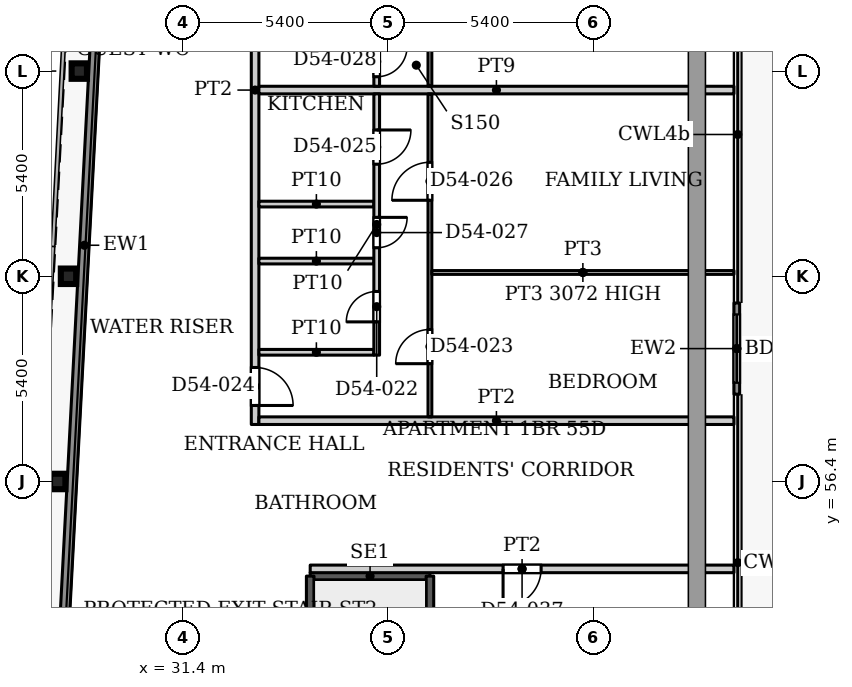
"""IFC4 building model, lengths in metres.
Left out: names, types, materials, properties, quantities, classifications, styles, units other than length and angle.
Written with IfcOpenShell. Run it as: python <this file> out.ifc"""

import sys

from ifc_helpers import new_model, si_unit, direction, frame, frame_2d, origin, origin_2d, place, context, subcontext, project, spatial, rectangle, i_section, extrude, source, transform, mapped, element, fill, save


model = new_model("IFC4")
c1 = context("Model", 3, precision=1e-05, world=origin(), true_north=direction((0.0, 1.0)))
c2 = subcontext(c1, "Body", "Model", "MODEL_VIEW")
j1 = project(units=[si_unit("LENGTHUNIT", "METRE"), si_unit("PLANEANGLEUNIT", "RADIAN")], contexts=[c1])
p1 = place(None, origin())
s1 = spatial("IfcSite", under=j1, at=p1, CompositionType="ELEMENT")
p2 = place(p1, origin())
s2 = spatial("IfcBuilding", under=s1, at=p2, CompositionType="ELEMENT")
p3 = place(p2, frame((0.0, 0.0, 235.7)))
s3 = spatial("IfcBuildingStorey", under=s2, at=p3, CompositionType="ELEMENT", Elevation=235.7)
for number, where, z_axis, x_axis in (
    (1, (28.106, 56.4, 0.0), (0.0, 0.0, 1.0), (1.0, 0.0, 0.0)),
    (2, (28.39, 61.8, 0.0), (0.0, 0.0, 1.0), (1.0, 0.0, 0.0)),
    (3, (28.674, 67.2, 0.0), (0.0, 0.0, 1.0), (1.0, 0.0, 0.0)),
):
    element("IfcColumn", number, at=place(p3, frame(where, z_axis=z_axis, x_axis=x_axis)), inside=s3, PredefinedType="COLUMN", context=c2, shape_type="SweptSolid", body=[
        extrude(i_section(OverallWidth=0.404, OverallDepth=0.407, WebThickness=0.027, FlangeThickness=0.044, FilletRadius=0.012, at=origin_2d()), origin(), (0.0, 0.0, 1.0), 3.9),
    ])
p4 = place(p3, frame((45.975, 61.097, 0.0), z_axis=(0.0, 0.0, 1.0), x_axis=(0.0, -1.0, 0.0)))
e4 = element("IfcWall", 4, at=p4, inside=s3, PredefinedType="SOLIDWALL", context=c2, shape_type="SweptSolid", body=[
    extrude(rectangle(XDim=2.4, YDim=0.15, at=frame_2d((1.2, 0.0))), origin(), (0.0, 0.0, 1.0), 3.75),
])
p5 = place(p4, frame((0.3, 0.0, 0.0)))
e5 = element("IfcOpeningElement", 5, at=p5, cuts=e4, PredefinedType="OPENING", context=c2, shape_type="SweptSolid", body=[
    extrude(rectangle(XDim=1.8, YDim=2.4, at=frame_2d((0.9, 1.2))), frame((0.0, 0.085, 0.0), z_axis=(0.0, -1.0, 0.0), x_axis=(1.0, 0.0, 0.0)), (0.0, 0.0, 1.0), 0.17),
])
p6 = place(p3, frame((27.195, 31.969, 0.0), z_axis=(0.0, 0.0, 1.0), x_axis=(0.052555284099, 0.998618016117, 0.0)))
e6 = element("IfcWall", 6, at=p6, inside=s3, PredefinedType="SOLIDWALL", context=c2, shape_type="SweptSolid", body=[
    extrude(rectangle(XDim=61.38, YDim=0.25, at=frame_2d((30.69, 0.0))), origin(), (0.0, 0.0, 1.0), 3.75),
])
p7 = place(p3, frame((34.75, 53.91, 0.0), z_axis=(0.0, 0.0, 1.0), x_axis=(1.0, 0.0, 0.0)))
e7 = element("IfcWall", 7, at=p7, inside=s3, PredefinedType="SHEAR", context=c2, shape_type="SweptSolid", body=[
    extrude(rectangle(XDim=3.15, YDim=0.2, at=frame_2d((1.575, 0.0))), origin(), (0.0, 0.0, 1.0), 3.9),
])
p8 = place(p3, frame((34.75, 47.5, 0.0), z_axis=(0.0, 0.0, 1.0), x_axis=(0.0, 1.0, 0.0)))
e8 = element("IfcWall", 8, at=p8, inside=s3, PredefinedType="SHEAR", context=c2, shape_type="SweptSolid", body=[
    extrude(rectangle(XDim=6.41, YDim=0.2, at=frame_2d((3.205, 0.0))), origin(), (0.0, 0.0, 1.0), 3.9),
])
p9 = place(p3, frame((37.9, 44.75, 0.0), z_axis=(0.0, 0.0, 1.0), x_axis=(0.0, 1.0, 0.0)))
e9 = element("IfcWall", 9, at=p9, inside=s3, PredefinedType="SHEAR", context=c2, shape_type="SweptSolid", body=[
    extrude(rectangle(XDim=9.16, YDim=0.2, at=frame_2d((4.58, 0.0))), origin(), (0.0, 0.0, 1.0), 3.9),
])
p10 = place(p3, frame((33.3, 57.9, 0.0), z_axis=(0.0, 0.0, 1.0), x_axis=(0.0, 1.0, 0.0)))
e10 = element("IfcWall", 10, at=p10, inside=s3, PredefinedType="PARTITIONING", context=c2, shape_type="SweptSolid", body=[
    extrude(rectangle(XDim=17.6, YDim=0.2, at=frame_2d((8.8, 0.0))), origin(), (0.0, 0.0, 1.0), 3.6),
])
p11 = place(p10, frame((0.5, 0.0, 0.0)))
e11 = element("IfcOpeningElement", 11, at=p11, cuts=e10, PredefinedType="OPENING", context=c2, shape_type="SweptSolid", body=[
    extrude(rectangle(XDim=1.0, YDim=2.1, at=frame_2d((0.5, 1.05))), frame((0.0, 0.11, 0.0), z_axis=(0.0, -1.0, 0.0), x_axis=(1.0, 0.0, 0.0)), (0.0, 0.0, 1.0), 0.22),
])
p12 = place(p10, frame((16.1, 0.0, 0.0)))
e12 = element("IfcOpeningElement", 12, at=p12, cuts=e10, PredefinedType="OPENING", context=c2, shape_type="SweptSolid", body=[
    extrude(rectangle(XDim=1.0, YDim=2.1, at=frame_2d((0.5, 1.05))), frame((0.0, 0.11, 0.0), z_axis=(0.0, -1.0, 0.0), x_axis=(1.0, 0.0, 0.0)), (0.0, 0.0, 1.0), 0.22),
])
p13 = place(p3, frame((33.4, 58.0, 0.0), z_axis=(0.0, 0.0, 1.0), x_axis=(1.0, 0.0, 0.0)))
e13 = element("IfcWall", 13, at=p13, inside=s3, PredefinedType="PARTITIONING", context=c2, shape_type="SweptSolid", body=[
    extrude(rectangle(XDim=12.5, YDim=0.2, at=frame_2d((6.25, 0.0))), origin(), (0.0, 0.0, 1.0), 3.6),
])
for number, where, z_axis, x_axis in (
    (14, (33.4, 59.8, 0.0), (0.0, 0.0, 1.0), (1.0, 0.0, 0.0)),
    (15, (33.4, 62.2, 0.0), (0.0, 0.0, 1.0), (1.0, 0.0, 0.0)),
    (16, (33.4, 63.7, 0.0), (0.0, 0.0, 1.0), (1.0, 0.0, 0.0)),
):
    element("IfcWall", number, at=place(p3, frame(where, z_axis=z_axis, x_axis=x_axis)), inside=s3, PredefinedType="PARTITIONING", context=c2, shape_type="SweptSolid", body=[
        extrude(rectangle(XDim=3.025, YDim=0.15, at=frame_2d((1.513, 0.0))), origin(), (0.0, 0.0, 1.0), 3.6),
    ])
p14 = place(p3, frame((33.4, 66.7, 0.0), z_axis=(0.0, 0.0, 1.0), x_axis=(1.0, 0.0, 0.0)))
e17 = element("IfcWall", 17, at=p14, inside=s3, PredefinedType="PARTITIONING", context=c2, shape_type="SweptSolid", body=[
    extrude(rectangle(XDim=12.5, YDim=0.2, at=frame_2d((6.25, 0.0))), origin(), (0.0, 0.0, 1.0), 3.6),
])
p15 = place(p3, frame((34.75, 54.1, 0.0), z_axis=(0.0, 0.0, 1.0), x_axis=(1.0, 0.0, 0.0)))
e18 = element("IfcWall", 18, at=p15, inside=s3, PredefinedType="PARTITIONING", context=c2, shape_type="SweptSolid", body=[
    extrude(rectangle(XDim=11.15, YDim=0.2, at=frame_2d((5.575, 0.0))), origin(), (0.0, 0.0, 1.0), 3.6),
])
p16 = place(p15, frame((5.075, 0.0, 0.0)))
e19 = element("IfcOpeningElement", 19, at=p16, cuts=e18, PredefinedType="OPENING", context=c2, shape_type="SweptSolid", body=[
    extrude(rectangle(XDim=1.0, YDim=2.1, at=frame_2d((0.5, 1.05))), frame((0.0, 0.11, 0.0), z_axis=(0.0, -1.0, 0.0), x_axis=(1.0, 0.0, 0.0)), (0.0, 0.0, 1.0), 0.22),
])
p17 = place(p3, frame((36.5, 59.725, 0.0), z_axis=(0.0, 0.0, 1.0), x_axis=(0.0, 1.0, 0.0)))
e20 = element("IfcWall", 20, at=p17, inside=s3, PredefinedType="PARTITIONING", context=c2, shape_type="SweptSolid", body=[
    extrude(rectangle(XDim=6.875, YDim=0.15, at=frame_2d((3.438, 0.0))), origin(), (0.0, 0.0, 1.0), 3.6),
])
p18 = place(p17, frame((0.875, 0.0, 0.0)))
e21 = element("IfcOpeningElement", 21, at=p18, cuts=e20, PredefinedType="OPENING", context=c2, shape_type="SweptSolid", body=[
    extrude(rectangle(XDim=0.8, YDim=2.1, at=frame_2d((0.4, 1.05))), frame((0.0, 0.085, 0.0), z_axis=(0.0, -1.0, 0.0), x_axis=(1.0, 0.0, 0.0)), (0.0, 0.0, 1.0), 0.17),
])
p19 = place(p17, frame((5.025, 0.0, 0.0)))
e22 = element("IfcOpeningElement", 22, at=p19, cuts=e20, PredefinedType="OPENING", context=c2, shape_type="SweptSolid", body=[
    extrude(rectangle(XDim=0.9, YDim=2.1, at=frame_2d((0.45, 1.05))), frame((0.0, 0.085, 0.0), z_axis=(0.0, -1.0, 0.0), x_axis=(1.0, 0.0, 0.0)), (0.0, 0.0, 1.0), 0.17),
])
p20 = place(p17, frame((2.825, 0.0, 0.0)))
e23 = element("IfcOpeningElement", 23, at=p20, cuts=e20, PredefinedType="OPENING", context=c2, shape_type="SweptSolid", body=[
    extrude(rectangle(XDim=0.8, YDim=2.1, at=frame_2d((0.4, 1.05))), frame((0.0, 0.085, 0.0), z_axis=(0.0, -1.0, 0.0), x_axis=(1.0, 0.0, 0.0)), (0.0, 0.0, 1.0), 0.17),
])
p21 = place(p3, frame((36.5, 66.8, 0.0), z_axis=(0.0, 0.0, 1.0), x_axis=(0.0, 1.0, 0.0)))
e24 = element("IfcWall", 24, at=p21, inside=s3, PredefinedType="PARTITIONING", context=c2, shape_type="SweptSolid", body=[
    extrude(rectangle(XDim=6.85, YDim=0.15, at=frame_2d((3.425, 0.0))), origin(), (0.0, 0.0, 1.0), 3.6),
])
p22 = place(p21, frame((2.2, 0.0, 0.0)))
e25 = element("IfcOpeningElement", 25, at=p22, cuts=e24, PredefinedType="OPENING", context=c2, shape_type="SweptSolid", body=[
    extrude(rectangle(XDim=0.8, YDim=2.1, at=frame_2d((0.4, 1.05))), frame((0.0, 0.085, 0.0), z_axis=(0.0, -1.0, 0.0), x_axis=(1.0, 0.0, 0.0)), (0.0, 0.0, 1.0), 0.17),
])
p23 = place(p21, frame((4.85, 0.0, 0.0)))
e26 = element("IfcOpeningElement", 26, at=p23, cuts=e24, PredefinedType="OPENING", context=c2, shape_type="SweptSolid", body=[
    extrude(rectangle(XDim=0.9, YDim=2.1, at=frame_2d((0.45, 1.05))), frame((0.0, 0.085, 0.0), z_axis=(0.0, -1.0, 0.0), x_axis=(1.0, 0.0, 0.0)), (0.0, 0.0, 1.0), 0.17),
])
p24 = place(p21, frame((0.25, 0.0, 0.0)))
e27 = element("IfcOpeningElement", 27, at=p24, cuts=e24, PredefinedType="OPENING", context=c2, shape_type="SweptSolid", body=[
    extrude(rectangle(XDim=0.8, YDim=2.1, at=frame_2d((0.4, 1.05))), frame((0.0, 0.085, 0.0), z_axis=(0.0, -1.0, 0.0), x_axis=(1.0, 0.0, 0.0)), (0.0, 0.0, 1.0), 0.17),
])
p25 = place(p3, frame((37.9, 58.1, 0.0), z_axis=(0.0, 0.0, 1.0), x_axis=(0.0, 1.0, 0.0)))
e28 = element("IfcWall", 28, at=p25, inside=s3, PredefinedType="PARTITIONING", context=c2, shape_type="SweptSolid", body=[
    extrude(rectangle(XDim=8.5, YDim=0.1, at=frame_2d((4.25, 0.0))), origin(), (0.0, 0.0, 1.0), 3.6),
])
p26 = place(p25, frame((1.4, 0.0, 0.0)))
e29 = element("IfcOpeningElement", 29, at=p26, cuts=e28, PredefinedType="OPENING", context=c2, shape_type="SweptSolid", body=[
    extrude(rectangle(XDim=0.9, YDim=2.1, at=frame_2d((0.45, 1.05))), frame((0.0, 0.06, 0.0), z_axis=(0.0, -1.0, 0.0), x_axis=(1.0, 0.0, 0.0)), (0.0, 0.0, 1.0), 0.12),
])
p27 = place(p25, frame((5.7, 0.0, 0.0)))
e30 = element("IfcOpeningElement", 30, at=p27, cuts=e28, PredefinedType="OPENING", context=c2, shape_type="SweptSolid", body=[
    extrude(rectangle(XDim=1.0, YDim=2.1, at=frame_2d((0.5, 1.05))), frame((0.0, 0.06, 0.0), z_axis=(0.0, -1.0, 0.0), x_axis=(1.0, 0.0, 0.0)), (0.0, 0.0, 1.0), 0.12),
])
p28 = place(p3, frame((37.9, 66.8, 0.0), z_axis=(0.0, 0.0, 1.0), x_axis=(0.0, 1.0, 0.0)))
e31 = element("IfcWall", 31, at=p28, inside=s3, PredefinedType="PARTITIONING", context=c2, shape_type="SweptSolid", body=[
    extrude(rectangle(XDim=8.5, YDim=0.1, at=frame_2d((4.25, 0.0))), origin(), (0.0, 0.0, 1.0), 3.6),
])
p29 = place(p28, frame((6.2, 0.0, 0.0)))
e32 = element("IfcOpeningElement", 32, at=p29, cuts=e31, PredefinedType="OPENING", context=c2, shape_type="SweptSolid", body=[
    extrude(rectangle(XDim=0.9, YDim=2.1, at=frame_2d((0.45, 1.05))), frame((0.0, 0.06, 0.0), z_axis=(0.0, -1.0, 0.0), x_axis=(1.0, 0.0, 0.0)), (0.0, 0.0, 1.0), 0.12),
])
p30 = place(p28, frame((1.8, 0.0, 0.0)))
e33 = element("IfcOpeningElement", 33, at=p30, cuts=e31, PredefinedType="OPENING", context=c2, shape_type="SweptSolid", body=[
    extrude(rectangle(XDim=1.0, YDim=2.1, at=frame_2d((0.5, 1.05))), frame((0.0, 0.06, 0.0), z_axis=(0.0, -1.0, 0.0), x_axis=(1.0, 0.0, 0.0)), (0.0, 0.0, 1.0), 0.12),
])
p31 = place(p3, frame((37.95, 61.9, 0.0), z_axis=(0.0, 0.0, 1.0), x_axis=(1.0, 0.0, 0.0)))
e34 = element("IfcWall", 34, at=p31, inside=s3, PredefinedType="PARTITIONING", context=c2, shape_type="SweptSolid", body=[
    extrude(rectangle(XDim=7.95, YDim=0.1, at=frame_2d((3.975, 0.0))), origin(), (0.0, 0.0, 1.0), 3.072),
])
m1 = source(origin(), c2, "Body", "SweptSolid", [
    extrude(rectangle(XDim=1.8, YDim=2.4, at=frame_2d((0.9, 1.2))), frame((0.0, 0.025, 0.0), z_axis=(0.0, -1.0, 0.0), x_axis=(1.0, 0.0, 0.0)), (0.0, 0.0, 1.0), 0.05),
])
p32 = place(p5, origin())
e35 = element("IfcDoor", 35, at=p32, inside=s3, OperationType="SLIDING_TO_LEFT", PredefinedType="DOOR", context=c2, shape_type="MappedRepresentation", body=[
    mapped(m1, transform((0.0, 0.0, 0.0), x_axis=(1.0, 0.0, 0.0), y_axis=(0.0, 1.0, 0.0), z_axis=(0.0, 0.0, 1.0), scale=1.0)),
])
fill(e5, e35)
m2 = source(origin(), c2, "Body", "SweptSolid", [
    extrude(rectangle(XDim=0.8, YDim=2.1, at=frame_2d((0.4, 1.05))), frame((0.0, 0.025, 0.0), z_axis=(0.0, -1.0, 0.0), x_axis=(1.0, 0.0, 0.0)), (0.0, 0.0, 1.0), 0.05),
])
p33 = place(p18, origin())
e36 = element("IfcDoor", 36, at=p33, inside=s3, OperationType="SINGLE_SWING_LEFT", PredefinedType="DOOR", context=c2, shape_type="MappedRepresentation", body=[
    mapped(m2, transform((0.0, 0.0, 0.0), x_axis=(1.0, 0.0, 0.0), y_axis=(0.0, 1.0, 0.0), z_axis=(0.0, 0.0, 1.0), scale=1.0)),
])
fill(e21, e36)
m3 = source(origin(), c2, "Body", "SweptSolid", [
    extrude(rectangle(XDim=0.9, YDim=2.1, at=frame_2d((0.45, 1.05))), frame((0.0, 0.025, 0.0), z_axis=(0.0, -1.0, 0.0), x_axis=(1.0, 0.0, 0.0)), (0.0, 0.0, 1.0), 0.05),
])
p34 = place(p26, origin())
e37 = element("IfcDoor", 37, at=p34, inside=s3, OperationType="SINGLE_SWING_LEFT", PredefinedType="DOOR", context=c2, shape_type="MappedRepresentation", body=[
    mapped(m3, transform((0.0, 0.0, 0.0), x_axis=(1.0, 0.0, 0.0), y_axis=(0.0, 1.0, 0.0), z_axis=(0.0, 0.0, 1.0), scale=1.0)),
])
fill(e29, e37)
m4 = source(origin(), c2, "Body", "SweptSolid", [
    extrude(rectangle(XDim=1.0, YDim=2.1, at=frame_2d((0.5, 1.05))), frame((0.0, 0.025, 0.0), z_axis=(0.0, -1.0, 0.0), x_axis=(1.0, 0.0, 0.0)), (0.0, 0.0, 1.0), 0.05),
])
p35 = place(p11, origin())
e38 = element("IfcDoor", 38, at=p35, inside=s3, OperationType="SINGLE_SWING_RIGHT", PredefinedType="DOOR", context=c2, shape_type="MappedRepresentation", body=[
    mapped(m4, transform((0.0, 0.0, 0.0), x_axis=(1.0, 0.0, 0.0), y_axis=(0.0, 1.0, 0.0), z_axis=(0.0, 0.0, 1.0), scale=1.0)),
])
fill(e11, e38)
p36 = place(p19, origin())
e39 = element("IfcDoor", 39, at=p36, inside=s3, OperationType="SINGLE_SWING_RIGHT", PredefinedType="DOOR", context=c2, shape_type="MappedRepresentation", body=[
    mapped(m3, transform((0.0, 0.0, 0.0), x_axis=(1.0, 0.0, 0.0), y_axis=(0.0, 1.0, 0.0), z_axis=(0.0, 0.0, 1.0), scale=1.0)),
])
fill(e22, e39)
m5 = source(origin(), c2, "Body", "SweptSolid", [
    extrude(rectangle(XDim=1.0, YDim=2.1, at=frame_2d((0.5, 1.05))), frame((0.0, 0.025, 0.0), z_axis=(0.0, -1.0, 0.0), x_axis=(1.0, 0.0, 0.0)), (0.0, 0.0, 1.0), 0.05),
])
p37 = place(p27, origin())
e40 = element("IfcDoor", 40, at=p37, inside=s3, OperationType="SINGLE_SWING_LEFT", PredefinedType="DOOR", context=c2, shape_type="MappedRepresentation", body=[
    mapped(m5, transform((0.0, 0.0, 0.0), x_axis=(1.0, 0.0, 0.0), y_axis=(0.0, 1.0, 0.0), z_axis=(0.0, 0.0, 1.0), scale=1.0)),
])
fill(e30, e40)
p38 = place(p20, origin())
e41 = element("IfcDoor", 41, at=p38, inside=s3, OperationType="SINGLE_SWING_RIGHT", PredefinedType="DOOR", context=c2, shape_type="MappedRepresentation", body=[
    mapped(m2, transform((0.0, 0.0, 0.0), x_axis=(1.0, 0.0, 0.0), y_axis=(0.0, 1.0, 0.0), z_axis=(0.0, 0.0, 1.0), scale=1.0)),
])
fill(e23, e41)
p39 = place(p24, origin())
e42 = element("IfcDoor", 42, at=p39, inside=s3, OperationType="SINGLE_SWING_RIGHT", PredefinedType="DOOR", context=c2, shape_type="MappedRepresentation", body=[
    mapped(m2, transform((0.0, 0.0, 0.0), x_axis=(1.0, 0.0, 0.0), y_axis=(0.0, 1.0, 0.0), z_axis=(0.0, 0.0, 1.0), scale=1.0)),
])
fill(e27, e42)
m6 = source(origin(), c2, "Body", "SweptSolid", [
    extrude(rectangle(XDim=1.0, YDim=2.1, at=frame_2d((0.5, 1.05))), frame((0.0, 0.025, 0.0), z_axis=(0.0, -1.0, 0.0), x_axis=(1.0, 0.0, 0.0)), (0.0, 0.0, 1.0), 0.05),
])
p40 = place(p16, origin())
e43 = element("IfcDoor", 43, at=p40, inside=s3, OperationType="SINGLE_SWING_RIGHT", PredefinedType="DOOR", context=c2, shape_type="MappedRepresentation", body=[
    mapped(m6, transform((0.0, 0.0, 0.0), x_axis=(1.0, 0.0, 0.0), y_axis=(0.0, 1.0, 0.0), z_axis=(0.0, 0.0, 1.0), scale=1.0)),
])
fill(e19, e43)
save(model, sys.argv[1])
